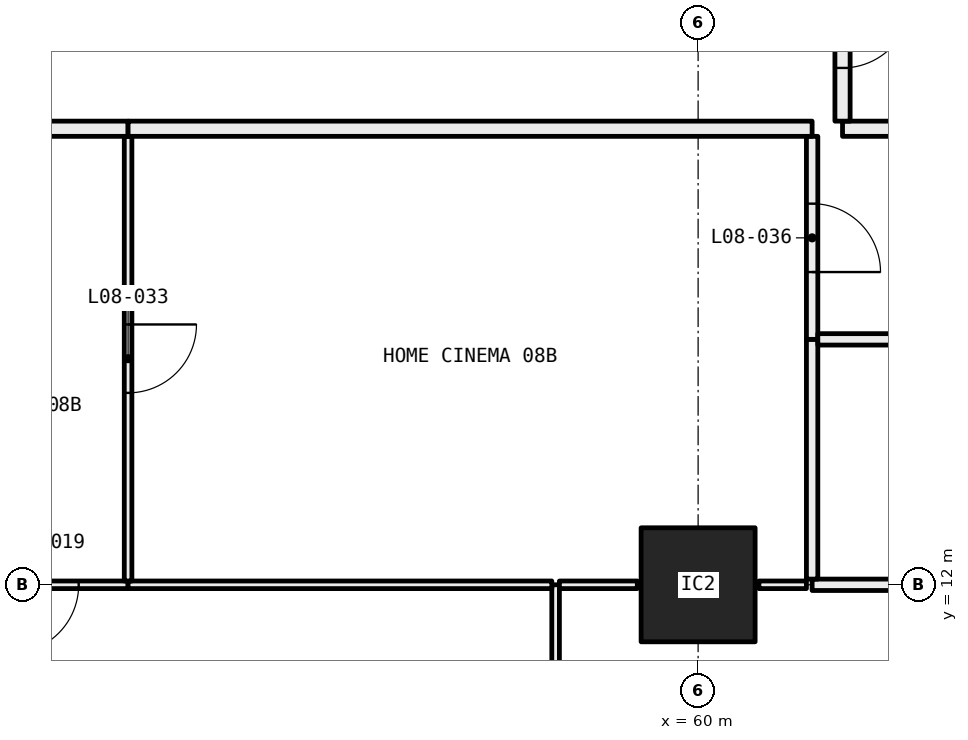
"""IFC4 building model, lengths in metres.
Left out: names, types, materials, properties, quantities, classifications, styles, units other than length and angle.
Written with IfcOpenShell. Run it as: python <this file> out.ifc"""

import sys

from ifc_helpers import new_model, si_unit, direction, frame, frame_2d, origin, origin_2d, place, context, subcontext, project, spatial, rectangle, hollow_rectangle, extrude, element, fill, save


model = new_model("IFC4")
c1 = context("Model", 3, precision=1e-05, world=origin(), true_north=direction((0.0, 1.0)))
c2 = subcontext(c1, "Body", "Model", "MODEL_VIEW")
j1 = project(units=[si_unit("LENGTHUNIT", "METRE"), si_unit("PLANEANGLEUNIT", "RADIAN")], contexts=[c1])
p1 = place(None, origin())
s1 = spatial("IfcSite", under=j1, at=p1, CompositionType="ELEMENT")
p2 = place(p1, origin())
s2 = spatial("IfcBuilding", under=s1, at=p2, CompositionType="ELEMENT")
p3 = place(p2, frame((0.0, 0.0, 40.35)))
s3 = spatial("IfcBuildingStorey", under=s2, at=p3, CompositionType="ELEMENT", Elevation=40.35)
p4 = place(p3, frame((60.0, 12.0, 0.0), z_axis=(0.0, 0.0, 1.0), x_axis=(1.0, 0.0, 0.0)))
e1 = element("IfcColumn", 1, at=p4, inside=s3, PredefinedType="COLUMN", context=c2, shape_type="SweptSolid", body=[
    extrude(hollow_rectangle(XDim=1.5, YDim=1.5, WallThickness=0.065, at=origin_2d()), origin(), (0.0, 0.0, 1.0), 3.05),
])
p5 = place(p3, frame((58.125, 6.05, 0.0), z_axis=(0.0, 0.0, 1.0), x_axis=(0.0, 1.0, 0.0)))
e2 = element("IfcWall", 2, at=p5, inside=s3, PredefinedType="PARTITIONING", context=c2, shape_type="SweptSolid", body=[
    extrude(rectangle(XDim=5.95, YDim=0.1, at=frame_2d((2.975, 0.0))), origin(), (0.0, 0.0, 1.0), 2.45),
])
p6 = place(p5, frame((2.525, 0.0, 0.0)))
e3 = element("IfcOpeningElement", 3, at=p6, cuts=e2, PredefinedType="OPENING", context=c2, shape_type="SweptSolid", body=[
    extrude(rectangle(XDim=0.9, YDim=2.1, at=frame_2d((0.45, 1.05))), frame((0.0, 0.06, 0.0), z_axis=(0.0, -1.0, 0.0), x_axis=(1.0, 0.0, 0.0)), (0.0, 0.0, 1.0), 0.12),
])
p7 = place(p3, frame((52.5, 12.0, 0.0), z_axis=(0.0, 0.0, 1.0), x_axis=(-1.0, 0.0, 0.0)))
e4 = element("IfcWall", 4, at=p7, inside=s3, PredefinedType="PARTITIONING", context=c2, shape_type="SweptSolid", body=[
    extrude(rectangle(XDim=2.2, YDim=0.1, at=frame_2d((1.1, 0.0))), origin(), (0.0, 0.0, 1.0), 2.45),
])
p8 = place(p7, frame((0.65, 0.0, 0.0)))
e5 = element("IfcOpeningElement", 5, at=p8, cuts=e4, PredefinedType="OPENING", context=c2, shape_type="SweptSolid", body=[
    extrude(rectangle(XDim=0.9, YDim=2.1, at=frame_2d((0.45, 1.05))), frame((0.0, 0.06, 0.0), z_axis=(0.0, -1.0, 0.0), x_axis=(1.0, 0.0, 0.0)), (0.0, 0.0, 1.0), 0.12),
])
p9 = place(p3, frame((58.075, 12.0, 0.0), z_axis=(0.0, 0.0, 1.0), x_axis=(-1.0, 0.0, 0.0)))
e6 = element("IfcWall", 6, at=p9, inside=s3, PredefinedType="PARTITIONING", context=c2, shape_type="SweptSolid", body=[
    extrude(rectangle(XDim=5.575, YDim=0.1, at=frame_2d((2.788, 0.0))), origin(), (0.0, 0.0, 1.0), 2.45),
])
p10 = place(p3, frame((59.2, 12.0, 0.0), z_axis=(0.0, 0.0, 1.0), x_axis=(-1.0, 0.0, 0.0)))
e7 = element("IfcWall", 7, at=p10, inside=s3, PredefinedType="PARTITIONING", context=c2, shape_type="SweptSolid", body=[
    extrude(rectangle(XDim=1.025, YDim=0.1, at=frame_2d((0.512, 0.0))), origin(), (0.0, 0.0, 1.0), 2.45),
])
p11 = place(p3, frame((61.425, 12.0, 0.0), z_axis=(0.0, 0.0, 1.0), x_axis=(-1.0, 0.0, 0.0)))
e8 = element("IfcWall", 8, at=p11, inside=s3, PredefinedType="PARTITIONING", context=c2, shape_type="SweptSolid", body=[
    extrude(rectangle(XDim=0.625, YDim=0.1, at=frame_2d((0.312, 0.0))), origin(), (0.0, 0.0, 1.0), 2.45),
])
p12 = place(p3, frame((65.216, 12.0, 0.0), z_axis=(0.0, 0.0, 1.0), x_axis=(-1.0, 0.0, 0.0)))
e9 = element("IfcWall", 9, at=p12, inside=s3, PredefinedType="PARTITIONING", context=c2, shape_type="SweptSolid", body=[
    extrude(rectangle(XDim=3.716, YDim=0.15, at=frame_2d((1.858, 0.0))), origin(), (0.0, 0.0, 1.0), 2.45),
])
p13 = place(p12, frame((1.408, 0.0, 0.0)))
e10 = element("IfcOpeningElement", 10, at=p13, cuts=e9, PredefinedType="OPENING", context=c2, shape_type="SweptSolid", body=[
    extrude(rectangle(XDim=0.9, YDim=2.1, at=frame_2d((0.45, 1.05))), frame((0.0, 0.085, 0.0), z_axis=(0.0, -1.0, 0.0), x_axis=(1.0, 0.0, 0.0)), (0.0, 0.0, 1.0), 0.17),
])
p14 = place(p3, frame((52.5, 12.05, 0.0), z_axis=(0.0, 0.0, 1.0), x_axis=(0.0, 1.0, 0.0)))
e11 = element("IfcWall", 11, at=p14, inside=s3, PredefinedType="PARTITIONING", context=c2, shape_type="SweptSolid", body=[
    extrude(rectangle(XDim=5.85, YDim=0.1, at=frame_2d((2.925, 0.0))), origin(), (0.0, 0.0, 1.0), 2.45),
])
p15 = place(p14, frame((2.475, 0.0, 0.0)))
e12 = element("IfcOpeningElement", 12, at=p15, cuts=e11, PredefinedType="OPENING", context=c2, shape_type="SweptSolid", body=[
    extrude(rectangle(XDim=0.9, YDim=2.1, at=frame_2d((0.45, 1.05))), frame((0.0, 0.06, 0.0), z_axis=(0.0, -1.0, 0.0), x_axis=(1.0, 0.0, 0.0)), (0.0, 0.0, 1.0), 0.12),
])
p16 = place(p3, frame((52.5, 18.0, 0.0), z_axis=(0.0, 0.0, 1.0), x_axis=(-1.0, 0.0, 0.0)))
e13 = element("IfcWall", 13, at=p16, inside=s3, PredefinedType="PARTITIONING", context=c2, shape_type="SweptSolid", body=[
    extrude(rectangle(XDim=4.5, YDim=0.2, at=frame_2d((2.25, 0.0))), origin(), (0.0, 0.0, 1.0), 3.05),
])
p17 = place(p16, frame((1.75, 0.0, 0.0)))
e14 = element("IfcOpeningElement", 14, at=p17, cuts=e13, PredefinedType="OPENING", context=c2, shape_type="SweptSolid", body=[
    extrude(rectangle(XDim=1.0, YDim=2.1, at=frame_2d((0.5, 1.05))), frame((0.0, 0.11, 0.0), z_axis=(0.0, -1.0, 0.0), x_axis=(1.0, 0.0, 0.0)), (0.0, 0.0, 1.0), 0.22),
])
p18 = place(p3, frame((61.5, 12.075, 0.0), z_axis=(0.0, 0.0, 1.0), x_axis=(0.0, 1.0, 0.0)))
e15 = element("IfcWall", 15, at=p18, inside=s3, PredefinedType="PARTITIONING", context=c2, shape_type="SweptSolid", body=[
    extrude(rectangle(XDim=3.154, YDim=0.15, at=frame_2d((1.577, 0.0))), origin(), (0.0, 0.0, 1.0), 2.45),
])
p19 = place(p3, frame((61.5, 15.229, 0.0), z_axis=(0.0, 0.0, 1.0), x_axis=(0.0, 1.0, 0.0)))
e16 = element("IfcWall", 16, at=p19, inside=s3, PredefinedType="PARTITIONING", context=c2, shape_type="SweptSolid", body=[
    extrude(rectangle(XDim=2.671, YDim=0.15, at=frame_2d((1.335, 0.0))), origin(), (0.0, 0.0, 1.0), 3.05),
])
p20 = place(p19, frame((0.885, 0.0, 0.0)))
e17 = element("IfcOpeningElement", 17, at=p20, cuts=e16, PredefinedType="OPENING", context=c2, shape_type="SweptSolid", body=[
    extrude(rectangle(XDim=0.9, YDim=2.1, at=frame_2d((0.45, 1.05))), frame((0.0, 0.085, 0.0), z_axis=(0.0, -1.0, 0.0), x_axis=(1.0, 0.0, 0.0)), (0.0, 0.0, 1.0), 0.17),
])
p21 = place(p3, frame((61.5, 18.0, 0.0), z_axis=(0.0, 0.0, 1.0), x_axis=(-1.0, 0.0, 0.0)))
e18 = element("IfcWall", 18, at=p21, inside=s3, PredefinedType="PARTITIONING", context=c2, shape_type="SweptSolid", body=[
    extrude(rectangle(XDim=9.0, YDim=0.2, at=frame_2d((4.5, 0.0))), origin(), (0.0, 0.0, 1.0), 3.05),
])
p22 = place(p3, frame((65.141, 15.229, 0.0), z_axis=(0.0, 0.0, 1.0), x_axis=(-1.0, 0.0, 0.0)))
e19 = element("IfcWall", 19, at=p22, inside=s3, PredefinedType="PARTITIONING", context=c2, shape_type="SweptSolid", body=[
    extrude(rectangle(XDim=3.566, YDim=0.15, at=frame_2d((1.783, 0.0))), origin(), (0.0, 0.0, 1.0), 3.05),
])
p23 = place(p3, frame((64.15, 18.0, 0.0), z_axis=(0.0, 0.0, 1.0), x_axis=(-1.0, 0.0, 0.0)))
e20 = element("IfcWall", 20, at=p23, inside=s3, PredefinedType="PARTITIONING", context=c2, shape_type="SweptSolid", body=[
    extrude(rectangle(XDim=2.25, YDim=0.2, at=frame_2d((1.125, 0.0))), origin(), (0.0, 0.0, 1.0), 3.05),
])
p24 = place(p3, frame((61.9, 20.4, 0.0), z_axis=(0.0, 0.0, 1.0), x_axis=(0.0, -1.0, 0.0)))
e21 = element("IfcWall", 21, at=p24, inside=s3, PredefinedType="PARTITIONING", context=c2, shape_type="SweptSolid", body=[
    extrude(rectangle(XDim=2.3, YDim=0.2, at=frame_2d((1.15, 0.0))), origin(), (0.0, 0.0, 1.0), 3.05),
])
p25 = place(p24, frame((0.7, 0.0, 0.0)))
e22 = element("IfcOpeningElement", 22, at=p25, cuts=e21, PredefinedType="OPENING", context=c2, shape_type="SweptSolid", body=[
    extrude(rectangle(XDim=0.9, YDim=2.1, at=frame_2d((0.45, 1.05))), frame((0.0, 0.11, 0.0), z_axis=(0.0, -1.0, 0.0), x_axis=(1.0, 0.0, 0.0)), (0.0, 0.0, 1.0), 0.22),
])
p26 = place(p8, origin())
e23 = element("IfcDoor", 23, at=p26, inside=s3, OperationType="SINGLE_SWING_LEFT", PredefinedType="DOOR", context=c2, shape_type="SweptSolid", body=[
    extrude(rectangle(XDim=0.9, YDim=2.1, at=frame_2d((0.45, 1.05))), frame((0.0, 0.025, 0.0), z_axis=(0.0, -1.0, 0.0), x_axis=(1.0, 0.0, 0.0)), (0.0, 0.0, 1.0), 0.05),
])
fill(e5, e23)
p27 = place(p15, frame((0.9, 0.0, 0.0), x_axis=(-1.0, 0.0, 0.0)))
e24 = element("IfcDoor", 24, at=p27, inside=s3, OperationType="SINGLE_SWING_RIGHT", PredefinedType="DOOR", context=c2, shape_type="SweptSolid", body=[
    extrude(rectangle(XDim=0.9, YDim=2.1, at=frame_2d((0.45, 1.05))), frame((0.0, 0.025, 0.0), z_axis=(0.0, -1.0, 0.0), x_axis=(1.0, 0.0, 0.0)), (0.0, 0.0, 1.0), 0.05),
])
fill(e12, e24)
p28 = place(p20, frame((0.9, 0.0, 0.0), x_axis=(-1.0, 0.0, 0.0)))
e25 = element("IfcDoor", 25, at=p28, inside=s3, OperationType="SINGLE_SWING_LEFT", PredefinedType="DOOR", context=c2, shape_type="SweptSolid", body=[
    extrude(rectangle(XDim=0.9, YDim=2.1, at=frame_2d((0.45, 1.05))), frame((0.0, 0.025, 0.0), z_axis=(0.0, -1.0, 0.0), x_axis=(1.0, 0.0, 0.0)), (0.0, 0.0, 1.0), 0.05),
])
fill(e17, e25)
p29 = place(p25, origin())
e26 = element("IfcDoor", 26, at=p29, inside=s3, OperationType="SINGLE_SWING_RIGHT", PredefinedType="DOOR", context=c2, shape_type="SweptSolid", body=[
    extrude(rectangle(XDim=0.9, YDim=2.1, at=frame_2d((0.45, 1.05))), frame((0.0, 0.025, 0.0), z_axis=(0.0, -1.0, 0.0), x_axis=(1.0, 0.0, 0.0)), (0.0, 0.0, 1.0), 0.05),
])
fill(e22, e26)
save(model, sys.argv[1])
